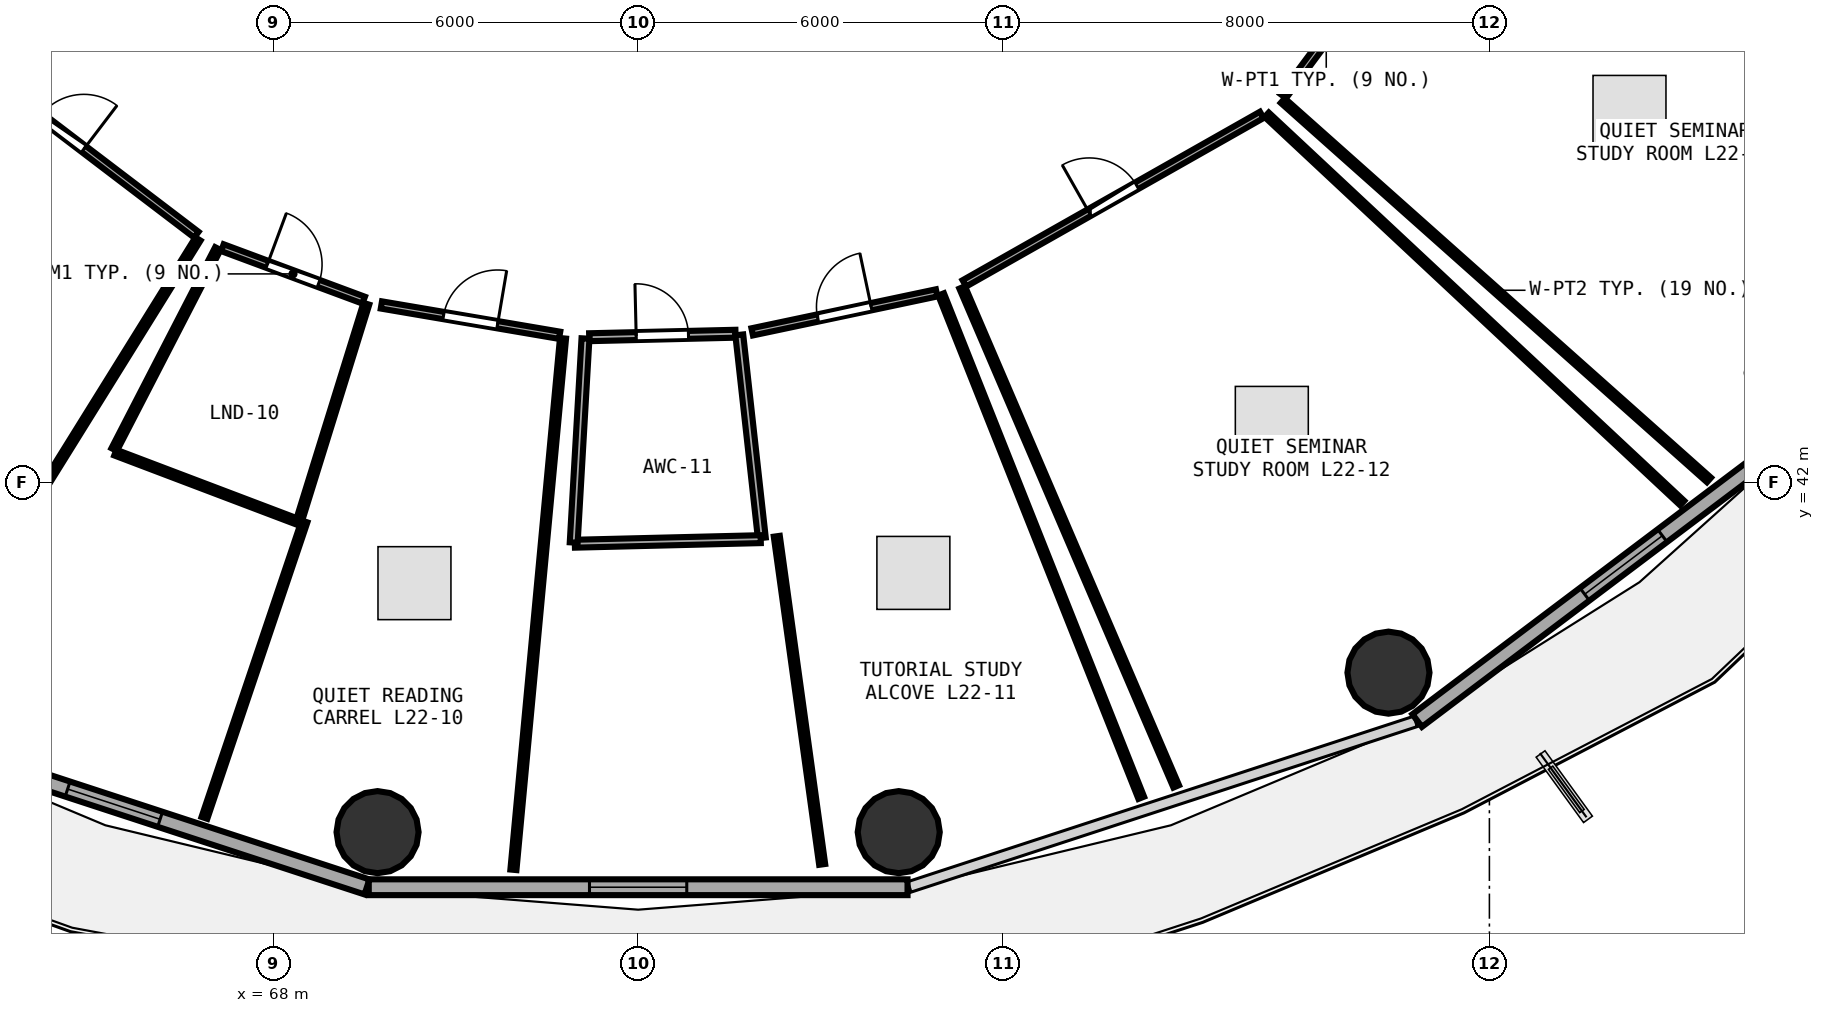
"""IFC4 building model, lengths in metres.
Left out: names, types, materials, properties, quantities, classifications, styles, units other than length and angle.
Written with IfcOpenShell. Run it as: python <this file> out.ifc"""

import sys

from ifc_helpers import new_model, si_unit, direction, frame, frame_2d, origin, origin_2d, place, context, subcontext, project, spatial, rectangle, circle, extrude, element, fill, save


model = new_model("IFC4")
c1 = context("Model", 3, precision=1e-05, world=origin(), true_north=direction((0.0, 1.0)))
c2 = subcontext(c1, "Body", "Model", "MODEL_VIEW")
j1 = project(units=[si_unit("LENGTHUNIT", "METRE"), si_unit("PLANEANGLEUNIT", "RADIAN")], contexts=[c1])
p1 = place(None, origin())
s1 = spatial("IfcSite", under=j1, at=p1, CompositionType="ELEMENT")
p2 = place(p1, origin())
s2 = spatial("IfcBuilding", under=s1, at=p2, CompositionType="ELEMENT")
p3 = place(p2, frame((0.0, 0.0, 87.6)))
s3 = spatial("IfcBuildingStorey", under=s2, at=p3, CompositionType="ELEMENT", Elevation=87.6)
for number, where, z_axis, x_axis in (
    (1, (69.714, 36.255, 0.0), (0.0, 0.0, 1.0), (1.0, 0.0, 0.0)),
    (2, (78.286, 36.255, 0.0), (0.0, 0.0, 1.0), (1.0, 0.0, 0.0)),
    (3, (86.34, 38.878, 0.0), (0.0, 0.0, 1.0), (1.0, 0.0, 0.0)),
):
    element("IfcColumn", number, at=place(p3, frame(where, z_axis=z_axis, x_axis=x_axis)), inside=s3, PredefinedType="COLUMN", context=c2, shape_type="SweptSolid", body=[
        extrude(circle(Radius=0.675, at=origin_2d()), origin(), (0.0, 0.0, 1.0), 3.75),
    ])
p4 = place(p3, frame((61.214, 38.077, 0.0), z_axis=(0.0, 0.0, 1.0), x_axis=(0.950471101963, -0.310812941064, 0.0)))
e4 = element("IfcWall", 4, at=p4, inside=s3, PredefinedType="SOLIDWALL", context=c2, shape_type="SweptSolid", body=[
    extrude(rectangle(XDim=8.76, YDim=0.26, at=frame_2d((4.38, 0.0))), origin(), (0.0, 0.0, 1.0), 3.475),
])
p5 = place(p4, frame((3.58, 0.0, 0.85)))
e5 = element("IfcOpeningElement", 5, at=p5, cuts=e4, PredefinedType="OPENING", context=c2, shape_type="SweptSolid", body=[
    extrude(rectangle(XDim=1.6, YDim=1.45, at=frame_2d((0.8, 0.725))), frame((0.0, 0.14, 0.0), z_axis=(0.0, -1.0, 0.0), x_axis=(1.0, 0.0, 0.0)), (0.0, 0.0, 1.0), 0.28),
])
p6 = place(p3, frame((69.57, 35.349, 0.0), z_axis=(0.0, 0.0, 1.0), x_axis=(1.0, 0.0, 0.0)))
e6 = element("IfcWall", 6, at=p6, inside=s3, PredefinedType="SOLIDWALL", context=c2, shape_type="SweptSolid", body=[
    extrude(rectangle(XDim=8.861, YDim=0.26, at=frame_2d((4.43, 0.0))), origin(), (0.0, 0.0, 1.0), 3.475),
])
p7 = place(p6, frame((3.63, 0.0, 0.85)))
e7 = element("IfcOpeningElement", 7, at=p7, cuts=e6, PredefinedType="OPENING", context=c2, shape_type="SweptSolid", body=[
    extrude(rectangle(XDim=1.6, YDim=1.45, at=frame_2d((0.8, 0.725))), frame((0.0, 0.14, 0.0), z_axis=(0.0, -1.0, 0.0), x_axis=(1.0, 0.0, 0.0)), (0.0, 0.0, 1.0), 0.28),
])
p8 = place(p3, frame((86.812, 38.09, 0.0), z_axis=(0.0, 0.0, 1.0), x_axis=(0.798501507879, 0.601992808857, 0.0)))
e8 = element("IfcWall", 8, at=p8, inside=s3, PredefinedType="SOLIDWALL", context=c2, shape_type="SweptSolid", body=[
    extrude(rectangle(XDim=8.499, YDim=0.26, at=frame_2d((4.25, 0.0))), origin(), (0.0, 0.0, 1.0), 3.475),
])
p9 = place(p8, frame((3.45, 0.0, 0.85)))
e9 = element("IfcOpeningElement", 9, at=p9, cuts=e8, PredefinedType="OPENING", context=c2, shape_type="SweptSolid", body=[
    extrude(rectangle(XDim=1.6, YDim=1.45, at=frame_2d((0.8, 0.725))), frame((0.0, 0.14, 0.0), z_axis=(0.0, -1.0, 0.0), x_axis=(1.0, 0.0, 0.0)), (0.0, 0.0, 1.0), 0.28),
])
p10 = place(p3, frame((62.318, 49.442, 0.0), z_axis=(0.0, 0.0, 1.0), x_axis=(0.795762794985, -0.605608432997, 0.0)))
e10 = element("IfcWall", 10, at=p10, inside=s3, PredefinedType="PARTITIONING", context=c2, shape_type="SweptSolid", body=[
    extrude(rectangle(XDim=5.55, YDim=0.12, at=frame_2d((2.775, 0.0))), origin(), (0.0, 0.0, 1.0), 2.925),
])
p11 = place(p10, frame((2.325, 0.0, 0.0)))
e11 = element("IfcOpeningElement", 11, at=p11, cuts=e10, PredefinedType="OPENING", context=c2, shape_type="SweptSolid", body=[
    extrude(rectangle(XDim=0.9, YDim=2.08, at=frame_2d((0.45, 1.04))), frame((0.0, 0.07, 0.0), z_axis=(0.0, -1.0, 0.0), x_axis=(1.0, 0.0, 0.0)), (0.0, 0.0, 1.0), 0.14),
])
p12 = place(p3, frame((67.162, 45.867, 0.0), z_axis=(0.0, 0.0, 1.0), x_axis=(0.937401389833, -0.348250821018, 0.0)))
e12 = element("IfcWall", 12, at=p12, inside=s3, PredefinedType="PARTITIONING", context=c2, shape_type="SweptSolid", body=[
    extrude(rectangle(XDim=2.479, YDim=0.12, at=frame_2d((1.24, 0.0))), origin(), (0.0, 0.0, 1.0), 2.925),
])
p13 = place(p12, frame((0.789, 0.0, 0.0)))
e13 = element("IfcOpeningElement", 13, at=p13, cuts=e12, PredefinedType="OPENING", context=c2, shape_type="SweptSolid", body=[
    extrude(rectangle(XDim=0.9, YDim=2.08, at=frame_2d((0.45, 1.04))), frame((0.0, 0.07, 0.0), z_axis=(0.0, -1.0, 0.0), x_axis=(1.0, 0.0, 0.0)), (0.0, 0.0, 1.0), 0.14),
])
p14 = place(p3, frame((69.777, 44.925, 0.0), z_axis=(0.0, 0.0, 1.0), x_axis=(0.985835901267, -0.167712777608, 0.0)))
e14 = element("IfcWall", 14, at=p14, inside=s3, PredefinedType="PARTITIONING", context=c2, shape_type="SweptSolid", body=[
    extrude(rectangle(XDim=2.974, YDim=0.12, at=frame_2d((1.487, 0.0))), origin(), (0.0, 0.0, 1.0), 3.48),
])
p15 = place(p14, frame((1.037, 0.0, 0.0)))
e15 = element("IfcOpeningElement", 15, at=p15, cuts=e14, PredefinedType="OPENING", context=c2, shape_type="SweptSolid", body=[
    extrude(rectangle(XDim=0.9, YDim=2.08, at=frame_2d((0.45, 1.04))), frame((0.0, 0.07, 0.0), z_axis=(0.0, -1.0, 0.0), x_axis=(1.0, 0.0, 0.0)), (0.0, 0.0, 1.0), 0.14),
])
p16 = place(p3, frame((73.195, 44.394, 0.0), z_axis=(0.0, 0.0, 1.0), x_axis=(0.999715810971, 0.023838986867, 0.0)))
e16 = element("IfcWall", 16, at=p16, inside=s3, PredefinedType="PLUMBINGWALL", context=c2, shape_type="SweptSolid", body=[
    extrude(rectangle(XDim=2.407, YDim=0.13, at=frame_2d((1.203, 0.0))), origin(), (0.0, 0.0, 1.0), 3.48),
])
p17 = place(p16, frame((0.773, 0.0, 0.0)))
e17 = element("IfcOpeningElement", 17, at=p17, cuts=e16, PredefinedType="OPENING", context=c2, shape_type="SweptSolid", body=[
    extrude(rectangle(XDim=0.86, YDim=2.05, at=frame_2d((0.43, 1.025))), frame((0.0, 0.075, 0.0), z_axis=(0.0, -1.0, 0.0), x_axis=(1.0, 0.0, 0.0)), (0.0, 0.0, 1.0), 0.15),
])
p18 = place(p3, frame((75.876, 44.482, 0.0), z_axis=(0.0, 0.0, 1.0), x_axis=(0.978387400111, 0.206780306856, 0.0)))
e18 = element("IfcWall", 18, at=p18, inside=s3, PredefinedType="PARTITIONING", context=c2, shape_type="SweptSolid", body=[
    extrude(rectangle(XDim=3.1, YDim=0.12, at=frame_2d((1.55, 0.0))), origin(), (0.0, 0.0, 1.0), 3.48),
])
p19 = place(p18, frame((1.1, 0.0, 0.0)))
e19 = element("IfcOpeningElement", 19, at=p19, cuts=e18, PredefinedType="OPENING", context=c2, shape_type="SweptSolid", body=[
    extrude(rectangle(XDim=0.9, YDim=2.08, at=frame_2d((0.45, 1.04))), frame((0.0, 0.07, 0.0), z_axis=(0.0, -1.0, 0.0), x_axis=(1.0, 0.0, 0.0)), (0.0, 0.0, 1.0), 0.14),
])
p20 = place(p3, frame((79.365, 45.28, 0.0), z_axis=(0.0, 0.0, 1.0), x_axis=(0.870068136537, 0.49293147372, 0.0)))
e20 = element("IfcWall", 20, at=p20, inside=s3, PredefinedType="PARTITIONING", context=c2, shape_type="SweptSolid", body=[
    extrude(rectangle(XDim=5.621, YDim=0.12, at=frame_2d((2.811, 0.0))), origin(), (0.0, 0.0, 1.0), 2.925),
])
p21 = place(p20, frame((2.36, 0.0, 0.0)))
e21 = element("IfcOpeningElement", 21, at=p21, cuts=e20, PredefinedType="OPENING", context=c2, shape_type="SweptSolid", body=[
    extrude(rectangle(XDim=0.9, YDim=2.08, at=frame_2d((0.45, 1.04))), frame((0.0, 0.07, 0.0), z_axis=(0.0, -1.0, 0.0), x_axis=(1.0, 0.0, 0.0)), (0.0, 0.0, 1.0), 0.14),
])
p22 = place(p3, frame((84.608, 48.36, 0.0), z_axis=(0.0, 0.0, 1.0), x_axis=(0.596833425992, 0.802365167251, 0.0)))
e22 = element("IfcWall", 22, at=p22, inside=s3, PredefinedType="PARTITIONING", context=c2, shape_type="SweptSolid", body=[
    extrude(rectangle(XDim=5.399, YDim=0.12, at=frame_2d((2.699, 0.0))), origin(), (0.0, 0.0, 1.0), 2.925),
])
p23 = place(p22, frame((2.249, 0.0, 0.0)))
e23 = element("IfcOpeningElement", 23, at=p23, cuts=e22, PredefinedType="OPENING", context=c2, shape_type="SweptSolid", body=[
    extrude(rectangle(XDim=0.9, YDim=2.08, at=frame_2d((0.45, 1.04))), frame((0.0, 0.07, 0.0), z_axis=(0.0, -1.0, 0.0), x_axis=(1.0, 0.0, 0.0)), (0.0, 0.0, 1.0), 0.14),
])
p24 = place(p3, frame((66.761, 46.01, 0.0), z_axis=(0.0, 0.0, 1.0), x_axis=(-0.528015738644, -0.849234584638, 0.0)))
e24 = element("IfcWall", 24, at=p24, inside=s3, PredefinedType="PARTITIONING", context=c2, shape_type="SweptSolid", body=[
    extrude(rectangle(XDim=8.338, YDim=0.1, at=frame_2d((4.169, 0.0))), origin(), (0.0, 0.0, 1.0), 3.175),
])
p25 = place(p3, frame((69.53, 44.945, 0.0), z_axis=(0.0, 0.0, 1.0), x_axis=(-0.296510682072, -0.955029536411, 0.0)))
e25 = element("IfcWall", 25, at=p25, inside=s3, PredefinedType="PARTITIONING", context=c2, shape_type="SweptSolid", body=[
    extrude(rectangle(XDim=3.72, YDim=0.1, at=frame_2d((1.86, 0.0))), origin(), (0.0, 0.0, 1.0), 2.925),
])
p26 = place(p3, frame((68.378, 41.368, 0.0), z_axis=(0.0, 0.0, 1.0), x_axis=(-0.935027341219, 0.354575621233, 0.0)))
e26 = element("IfcWall", 26, at=p26, inside=s3, PredefinedType="PARTITIONING", context=c2, shape_type="SweptSolid", body=[
    extrude(rectangle(XDim=3.183, YDim=0.1, at=frame_2d((1.592, 0.0))), origin(), (0.0, 0.0, 1.0), 2.925),
])
p27 = place(p3, frame((65.382, 42.546, 0.0), z_axis=(0.0, 0.0, 1.0), x_axis=(0.458413879464, 0.888738834031, 0.0)))
e27 = element("IfcWall", 27, at=p27, inside=s3, PredefinedType="PARTITIONING", context=c2, shape_type="SweptSolid", body=[
    extrude(rectangle(XDim=3.72, YDim=0.1, at=frame_2d((1.86, 0.0))), origin(), (0.0, 0.0, 1.0), 3.175),
])
p28 = place(p3, frame((72.764, 44.376, 0.0), z_axis=(0.0, 0.0, 1.0), x_axis=(-0.092917687898, -0.995673793607, 0.0)))
e28 = element("IfcWall", 28, at=p28, inside=s3, PredefinedType="PARTITIONING", context=c2, shape_type="SweptSolid", body=[
    extrude(rectangle(XDim=8.779, YDim=0.1, at=frame_2d((4.389, 0.0))), origin(), (0.0, 0.0, 1.0), 2.975),
])
p29 = place(p3, frame((66.867, 36.49, 0.0), z_axis=(0.0, 0.0, 1.0), x_axis=(0.319911741109, 0.947447348353, 0.0)))
e29 = element("IfcWall", 29, at=p29, inside=s3, PredefinedType="PARTITIONING", context=c2, shape_type="SweptSolid", body=[
    extrude(rectangle(XDim=5.146, YDim=0.1, at=frame_2d((2.573, 0.0))), origin(), (0.0, 0.0, 1.0), 2.925),
])
p30 = place(p3, frame((75.663, 44.433, 0.0), z_axis=(0.0, 0.0, 1.0), x_axis=(0.110311886913, -0.993897020624, 0.0)))
e30 = element("IfcWall", 30, at=p30, inside=s3, PredefinedType="PLUMBINGWALL", context=c2, shape_type="SweptSolid", body=[
    extrude(rectangle(XDim=3.36, YDim=0.13, at=frame_2d((1.68, 0.0))), origin(), (0.0, 0.0, 1.0), 3.175),
])
p31 = place(p3, frame((76.016, 41.073, 0.0), z_axis=(0.0, 0.0, 1.0), x_axis=(-0.999699597441, -0.024509485419, 0.0)))
e31 = element("IfcWall", 31, at=p31, inside=s3, PredefinedType="PLUMBINGWALL", context=c2, shape_type="SweptSolid", body=[
    extrude(rectangle(XDim=3.058, YDim=0.13, at=frame_2d((1.529, 0.0))), origin(), (0.0, 0.0, 1.0), 3.48),
])
p32 = place(p3, frame((72.94, 41.018, 0.0), z_axis=(0.0, 0.0, 1.0), x_axis=(0.057610459658, 0.998339138238, 0.0)))
e32 = element("IfcWall", 32, at=p32, inside=s3, PredefinedType="PLUMBINGWALL", context=c2, shape_type="SweptSolid", body=[
    extrude(rectangle(XDim=3.361, YDim=0.13, at=frame_2d((1.68, 0.0))), origin(), (0.0, 0.0, 1.0), 3.175),
])
p33 = place(p3, frame((78.983, 45.099, 0.0), z_axis=(0.0, 0.0, 1.0), x_axis=(0.369438475108, -0.929255192673, 0.0)))
e33 = element("IfcWall", 33, at=p33, inside=s3, PredefinedType="PARTITIONING", context=c2, shape_type="SweptSolid", body=[
    extrude(rectangle(XDim=8.909, YDim=0.1, at=frame_2d((4.455, 0.0))), origin(), (0.0, 0.0, 1.0), 2.925),
])
p34 = place(p3, frame((77.027, 35.725, 0.0), z_axis=(0.0, 0.0, 1.0), x_axis=(-0.136996790132, 0.990571491359, 0.0)))
e34 = element("IfcWall", 34, at=p34, inside=s3, PredefinedType="PARTITIONING", context=c2, shape_type="SweptSolid", body=[
    extrude(rectangle(XDim=5.448, YDim=0.1, at=frame_2d((2.724, 0.0))), origin(), (0.0, 0.0, 1.0), 2.975),
])
p35 = place(p3, frame((84.337, 48.053, 0.0), z_axis=(0.0, 0.0, 1.0), x_axis=(0.730663657097, -0.682737592489, 0.0)))
e35 = element("IfcWall", 35, at=p35, inside=s3, PredefinedType="PARTITIONING", context=c2, shape_type="SweptSolid", body=[
    extrude(rectangle(XDim=9.353, YDim=0.1, at=frame_2d((4.676, 0.0))), origin(), (0.0, 0.0, 1.0), 2.975),
])
p36 = place(p3, frame((82.849, 37.008, 0.0), z_axis=(0.0, 0.0, 1.0), x_axis=(-0.394269081074, 0.918995044442, 0.0)))
e36 = element("IfcWall", 36, at=p36, inside=s3, PredefinedType="PARTITIONING", context=c2, shape_type="SweptSolid", body=[
    extrude(rectangle(XDim=8.928, YDim=0.1, at=frame_2d((4.464, 0.0))), origin(), (0.0, 0.0, 1.0), 2.925),
])
p37 = place(p3, frame((91.611, 42.048, 0.0), z_axis=(0.0, 0.0, 1.0), x_axis=(-0.747021589751, 0.664799777713, 0.0)))
e37 = element("IfcWall", 37, at=p37, inside=s3, PredefinedType="PARTITIONING", context=c2, shape_type="SweptSolid", body=[
    extrude(rectangle(XDim=9.383, YDim=0.1, at=frame_2d((4.691, 0.0))), origin(), (0.0, 0.0, 1.0), 2.975),
])
p38 = place(p5, origin())
e38 = element("IfcWindow", 38, at=p38, inside=s3, PartitioningType="SINGLE_PANEL", PredefinedType="WINDOW", context=c2, shape_type="SweptSolid", body=[
    extrude(rectangle(XDim=1.6, YDim=1.45, at=frame_2d((0.8, 0.725))), frame((0.0, 0.03, 0.0), z_axis=(0.0, -1.0, 0.0), x_axis=(1.0, 0.0, 0.0)), (0.0, 0.0, 1.0), 0.06),
])
fill(e5, e38)
p39 = place(p7, origin())
e39 = element("IfcWindow", 39, at=p39, inside=s3, PartitioningType="SINGLE_PANEL", PredefinedType="WINDOW", context=c2, shape_type="SweptSolid", body=[
    extrude(rectangle(XDim=1.6, YDim=1.45, at=frame_2d((0.8, 0.725))), frame((0.0, 0.03, 0.0), z_axis=(0.0, -1.0, 0.0), x_axis=(1.0, 0.0, 0.0)), (0.0, 0.0, 1.0), 0.06),
])
fill(e7, e39)
p40 = place(p9, origin())
e40 = element("IfcWindow", 40, at=p40, inside=s3, PartitioningType="SINGLE_PANEL", PredefinedType="WINDOW", context=c2, shape_type="SweptSolid", body=[
    extrude(rectangle(XDim=1.6, YDim=1.45, at=frame_2d((0.8, 0.725))), frame((0.0, 0.03, 0.0), z_axis=(0.0, -1.0, 0.0), x_axis=(1.0, 0.0, 0.0)), (0.0, 0.0, 1.0), 0.06),
])
fill(e9, e40)
p41 = place(p11, origin())
e41 = element("IfcDoor", 41, at=p41, inside=s3, OperationType="SINGLE_SWING_RIGHT", PredefinedType="DOOR", context=c2, shape_type="SweptSolid", body=[
    extrude(rectangle(XDim=0.9, YDim=2.08, at=frame_2d((0.45, 1.04))), frame((0.0, 0.025, 0.0), z_axis=(0.0, -1.0, 0.0), x_axis=(1.0, 0.0, 0.0)), (0.0, 0.0, 1.0), 0.05),
])
fill(e11, e41)
p42 = place(p13, origin())
e42 = element("IfcDoor", 42, at=p42, inside=s3, OperationType="SINGLE_SWING_LEFT", PredefinedType="DOOR", context=c2, shape_type="SweptSolid", body=[
    extrude(rectangle(XDim=0.9, YDim=2.08, at=frame_2d((0.45, 1.04))), frame((0.0, 0.025, 0.0), z_axis=(0.0, -1.0, 0.0), x_axis=(1.0, 0.0, 0.0)), (0.0, 0.0, 1.0), 0.05),
])
fill(e13, e42)
p43 = place(p15, origin())
e43 = element("IfcDoor", 43, at=p43, inside=s3, OperationType="SINGLE_SWING_RIGHT", PredefinedType="DOOR", context=c2, shape_type="SweptSolid", body=[
    extrude(rectangle(XDim=0.9, YDim=2.08, at=frame_2d((0.45, 1.04))), frame((0.0, 0.025, 0.0), z_axis=(0.0, -1.0, 0.0), x_axis=(1.0, 0.0, 0.0)), (0.0, 0.0, 1.0), 0.05),
])
fill(e15, e43)
p44 = place(p17, origin())
e44 = element("IfcDoor", 44, at=p44, inside=s3, OperationType="SINGLE_SWING_LEFT", PredefinedType="DOOR", context=c2, shape_type="SweptSolid", body=[
    extrude(rectangle(XDim=0.86, YDim=2.05, at=frame_2d((0.43, 1.025))), frame((0.0, 0.025, 0.0), z_axis=(0.0, -1.0, 0.0), x_axis=(1.0, 0.0, 0.0)), (0.0, 0.0, 1.0), 0.05),
])
fill(e17, e44)
p45 = place(p19, origin())
e45 = element("IfcDoor", 45, at=p45, inside=s3, OperationType="SINGLE_SWING_RIGHT", PredefinedType="DOOR", context=c2, shape_type="SweptSolid", body=[
    extrude(rectangle(XDim=0.9, YDim=2.08, at=frame_2d((0.45, 1.04))), frame((0.0, 0.025, 0.0), z_axis=(0.0, -1.0, 0.0), x_axis=(1.0, 0.0, 0.0)), (0.0, 0.0, 1.0), 0.05),
])
fill(e19, e45)
p46 = place(p21, origin())
e46 = element("IfcDoor", 46, at=p46, inside=s3, OperationType="SINGLE_SWING_LEFT", PredefinedType="DOOR", context=c2, shape_type="SweptSolid", body=[
    extrude(rectangle(XDim=0.9, YDim=2.08, at=frame_2d((0.45, 1.04))), frame((0.0, 0.025, 0.0), z_axis=(0.0, -1.0, 0.0), x_axis=(1.0, 0.0, 0.0)), (0.0, 0.0, 1.0), 0.05),
])
fill(e21, e46)
save(model, sys.argv[1])
